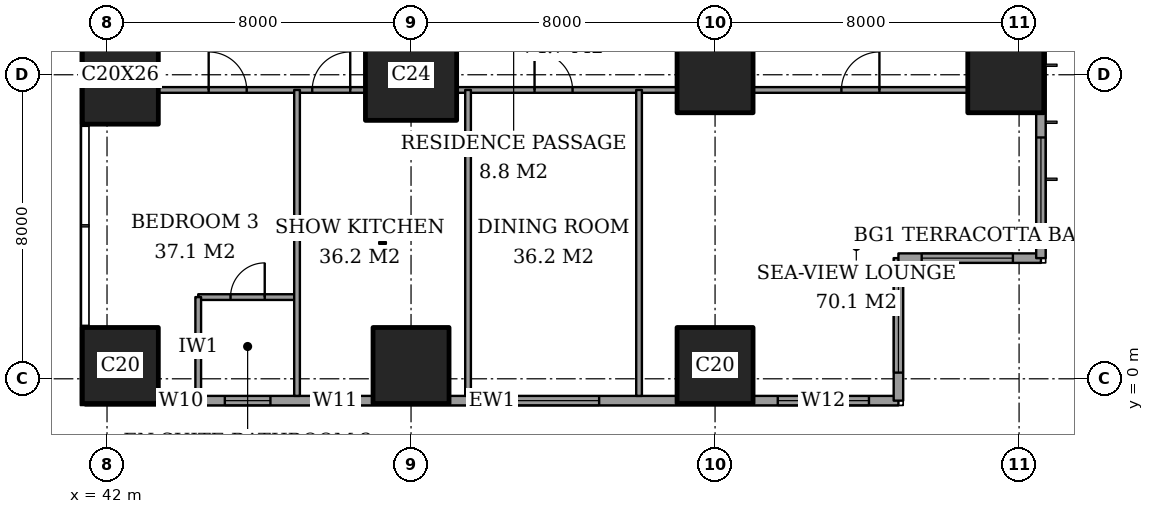
"""IFC4 building model, lengths in metres.
Left out: names, types, materials, properties, quantities, classifications, styles, units other than length and angle.
Written with IfcOpenShell. Run it as: python <this file> out.ifc"""

import sys

from ifc_helpers import new_model, si_unit, direction, frame, frame_2d, origin, origin_2d, place, context, subcontext, project, spatial, rectangle, extrude, element, fill, save


model = new_model("IFC4")
c1 = context("Model", 3, precision=1e-05, world=origin(), true_north=direction((0.0, 1.0)))
c2 = subcontext(c1, "Body", "Model", "MODEL_VIEW")
j1 = project(units=[si_unit("LENGTHUNIT", "METRE"), si_unit("PLANEANGLEUNIT", "RADIAN")], contexts=[c1])
p1 = place(None, origin())
s1 = spatial("IfcSite", under=j1, at=p1, CompositionType="ELEMENT")
p2 = place(p1, origin())
s2 = spatial("IfcBuilding", under=s1, at=p2, CompositionType="ELEMENT")
p3 = place(p2, frame((0.0, 0.0, 99.8)))
s3 = spatial("IfcBuildingStorey", under=s2, at=p3, CompositionType="ELEMENT", Elevation=99.8)
p4 = place(p3, frame((42.35, 0.35, 0.0), z_axis=(0.0, 0.0, 1.0), x_axis=(1.0, 0.0, 0.0)))
e1 = element("IfcColumn", 1, at=p4, inside=s3, PredefinedType="COLUMN", context=c2, shape_type="SweptSolid", body=[
    extrude(rectangle(XDim=2.0, YDim=2.0, at=origin_2d()), origin(), (0.0, 0.0, 1.0), 3.6),
])
p5 = place(p3, frame((42.35, 8.0, 0.0), z_axis=(0.0, 0.0, 1.0), x_axis=(1.0, 0.0, 0.0)))
e2 = element("IfcColumn", 2, at=p5, inside=s3, PredefinedType="COLUMN", context=c2, shape_type="SweptSolid", body=[
    extrude(rectangle(XDim=2.0, YDim=2.6, at=origin_2d()), origin(), (0.0, 0.0, 1.0), 3.6),
])
p6 = place(p3, frame((50.0, 0.35, 0.0), z_axis=(0.0, 0.0, 1.0), x_axis=(1.0, 0.0, 0.0)))
e3 = element("IfcColumn", 3, at=p6, inside=s3, PredefinedType="COLUMN", context=c2, shape_type="SweptSolid", body=[
    extrude(rectangle(XDim=2.0, YDim=2.0, at=origin_2d()), origin(), (0.0, 0.0, 1.0), 3.6),
])
p7 = place(p3, frame((50.0, 8.0, 0.0), z_axis=(0.0, 0.0, 1.0), x_axis=(1.0, 0.0, 0.0)))
e4 = element("IfcColumn", 4, at=p7, inside=s3, PredefinedType="COLUMN", context=c2, shape_type="SweptSolid", body=[
    extrude(rectangle(XDim=2.4, YDim=2.4, at=origin_2d()), origin(), (0.0, 0.0, 1.0), 3.6),
])
for number, where, z_axis, x_axis in (
    (5, (58.0, 0.35, 0.0), (0.0, 0.0, 1.0), (1.0, 0.0, 0.0)),
    (6, (58.0, 8.0, 0.0), (0.0, 0.0, 1.0), (1.0, 0.0, 0.0)),
    (7, (65.65, 8.0, 0.0), (0.0, 0.0, 1.0), (1.0, 0.0, 0.0)),
):
    element("IfcColumn", number, at=place(p3, frame(where, z_axis=z_axis, x_axis=x_axis)), inside=s3, PredefinedType="COLUMN", context=c2, shape_type="SweptSolid", body=[
        extrude(rectangle(XDim=2.0, YDim=2.0, at=origin_2d()), origin(), (0.0, 0.0, 1.0), 3.6),
    ])
p8 = place(p3, frame((41.425, -0.575, 0.0), z_axis=(0.0, 0.0, 1.0), x_axis=(1.0, 0.0, 0.0)))
e8 = element("IfcWall", 8, at=p8, inside=s3, PredefinedType="SOLIDWALL", context=c2, shape_type="SweptSolid", body=[
    extrude(rectangle(XDim=21.4, YDim=0.25, at=frame_2d((10.7, 0.0))), origin(), (0.0, 0.0, 1.0), 3.6),
])
p9 = place(p8, frame((2.225, 0.0, 0.4)))
e9 = element("IfcOpeningElement", 9, at=p9, cuts=e8, PredefinedType="OPENING", context=c2, shape_type="SweptSolid", body=[
    extrude(rectangle(XDim=0.6, YDim=2.2, at=frame_2d((0.3, 1.1))), frame((0.0, 0.135, 0.0), z_axis=(0.0, -1.0, 0.0), x_axis=(1.0, 0.0, 0.0)), (0.0, 0.0, 1.0), 0.27),
])
p10 = place(p8, frame((3.675, 0.0, 0.4)))
e10 = element("IfcOpeningElement", 10, at=p10, cuts=e8, PredefinedType="OPENING", context=c2, shape_type="SweptSolid", body=[
    extrude(rectangle(XDim=1.2, YDim=2.2, at=frame_2d((0.6, 1.1))), frame((0.0, 0.135, 0.0), z_axis=(0.0, -1.0, 0.0), x_axis=(1.0, 0.0, 0.0)), (0.0, 0.0, 1.0), 0.27),
])
p11 = place(p8, frame((5.975, 0.0, 0.4)))
e11 = element("IfcOpeningElement", 11, at=p11, cuts=e8, PredefinedType="OPENING", context=c2, shape_type="SweptSolid", body=[
    extrude(rectangle(XDim=1.2, YDim=2.2, at=frame_2d((0.6, 1.1))), frame((0.0, 0.135, 0.0), z_axis=(0.0, -1.0, 0.0), x_axis=(1.0, 0.0, 0.0)), (0.0, 0.0, 1.0), 0.27),
])
p12 = place(p8, frame((11.125, 0.0, 0.4)))
e12 = element("IfcOpeningElement", 12, at=p12, cuts=e8, PredefinedType="OPENING", context=c2, shape_type="SweptSolid", body=[
    extrude(rectangle(XDim=2.4, YDim=2.2, at=frame_2d((1.2, 1.1))), frame((0.0, 0.135, 0.0), z_axis=(0.0, -1.0, 0.0), x_axis=(1.0, 0.0, 0.0)), (0.0, 0.0, 1.0), 0.27),
])
p13 = place(p8, frame((18.225, 0.0, 0.4)))
e13 = element("IfcOpeningElement", 13, at=p13, cuts=e8, PredefinedType="OPENING", context=c2, shape_type="SweptSolid", body=[
    extrude(rectangle(XDim=2.4, YDim=2.2, at=frame_2d((1.2, 1.1))), frame((0.0, 0.135, 0.0), z_axis=(0.0, -1.0, 0.0), x_axis=(1.0, 0.0, 0.0)), (0.0, 0.0, 1.0), 0.27),
])
p14 = place(p3, frame((62.825, -0.575, 0.0), z_axis=(0.0, 0.0, 1.0), x_axis=(0.0, 1.0, 0.0)))
e14 = element("IfcWall", 14, at=p14, inside=s3, PredefinedType="SOLIDWALL", context=c2, shape_type="SweptSolid", body=[
    extrude(rectangle(XDim=3.75, YDim=0.25, at=frame_2d((1.875, 0.0))), origin(), (0.0, 0.0, 1.0), 3.6),
])
p15 = place(p14, frame((0.738, 0.0, 0.4)))
e15 = element("IfcOpeningElement", 15, at=p15, cuts=e14, PredefinedType="OPENING", context=c2, shape_type="SweptSolid", body=[
    extrude(rectangle(XDim=2.4, YDim=2.2, at=frame_2d((1.2, 1.1))), frame((0.0, 0.135, 0.0), z_axis=(0.0, -1.0, 0.0), x_axis=(1.0, 0.0, 0.0)), (0.0, 0.0, 1.0), 0.27),
])
p16 = place(p3, frame((62.825, 3.175, 0.0), z_axis=(0.0, 0.0, 1.0), x_axis=(1.0, 0.0, 0.0)))
e16 = element("IfcWall", 16, at=p16, inside=s3, PredefinedType="SOLIDWALL", context=c2, shape_type="SweptSolid", body=[
    extrude(rectangle(XDim=3.75, YDim=0.25, at=frame_2d((1.875, 0.0))), origin(), (0.0, 0.0, 1.0), 3.6),
])
p17 = place(p16, frame((0.613, 0.0, 0.4)))
e17 = element("IfcOpeningElement", 17, at=p17, cuts=e16, PredefinedType="OPENING", context=c2, shape_type="SweptSolid", body=[
    extrude(rectangle(XDim=2.4, YDim=2.2, at=frame_2d((1.2, 1.1))), frame((0.0, 0.135, 0.0), z_axis=(0.0, -1.0, 0.0), x_axis=(1.0, 0.0, 0.0)), (0.0, 0.0, 1.0), 0.27),
])
p18 = place(p3, frame((66.575, 3.175, 0.0), z_axis=(0.0, 0.0, 1.0), x_axis=(0.0, 1.0, 0.0)))
e18 = element("IfcWall", 18, at=p18, inside=s3, PredefinedType="SOLIDWALL", context=c2, shape_type="SweptSolid", body=[
    extrude(rectangle(XDim=41.65, YDim=0.25, at=frame_2d((20.825, 0.0))), origin(), (0.0, 0.0, 1.0), 3.6),
])
p19 = place(p18, frame((0.775, 0.0, 0.4)))
e19 = element("IfcOpeningElement", 19, at=p19, cuts=e18, PredefinedType="OPENING", context=c2, shape_type="SweptSolid", body=[
    extrude(rectangle(XDim=2.4, YDim=2.2, at=frame_2d((1.2, 1.1))), frame((0.0, 0.135, 0.0), z_axis=(0.0, -1.0, 0.0), x_axis=(1.0, 0.0, 0.0)), (0.0, 0.0, 1.0), 0.27),
])
p20 = place(p18, frame((6.1, 0.0, 0.4)))
e20 = element("IfcOpeningElement", 20, at=p20, cuts=e18, PredefinedType="OPENING", context=c2, shape_type="SweptSolid", body=[
    extrude(rectangle(XDim=1.2, YDim=2.2, at=frame_2d((0.6, 1.1))), frame((0.0, 0.135, 0.0), z_axis=(0.0, -1.0, 0.0), x_axis=(1.0, 0.0, 0.0)), (0.0, 0.0, 1.0), 0.27),
])
p21 = place(p18, frame((8.275, 0.0, 0.4)))
e21 = element("IfcOpeningElement", 21, at=p21, cuts=e18, PredefinedType="OPENING", context=c2, shape_type="SweptSolid", body=[
    extrude(rectangle(XDim=2.4, YDim=2.2, at=frame_2d((1.2, 1.1))), frame((0.0, 0.135, 0.0), z_axis=(0.0, -1.0, 0.0), x_axis=(1.0, 0.0, 0.0)), (0.0, 0.0, 1.0), 0.27),
])
p22 = place(p18, frame((15.775, 0.0, 0.4)))
e22 = element("IfcOpeningElement", 22, at=p22, cuts=e18, PredefinedType="OPENING", context=c2, shape_type="SweptSolid", body=[
    extrude(rectangle(XDim=2.4, YDim=2.2, at=frame_2d((1.2, 1.1))), frame((0.0, 0.135, 0.0), z_axis=(0.0, -1.0, 0.0), x_axis=(1.0, 0.0, 0.0)), (0.0, 0.0, 1.0), 0.27),
])
p23 = place(p18, frame((23.475, 0.0, 0.4)))
e23 = element("IfcOpeningElement", 23, at=p23, cuts=e18, PredefinedType="OPENING", context=c2, shape_type="SweptSolid", body=[
    extrude(rectangle(XDim=2.4, YDim=2.2, at=frame_2d((1.2, 1.1))), frame((0.0, 0.135, 0.0), z_axis=(0.0, -1.0, 0.0), x_axis=(1.0, 0.0, 0.0)), (0.0, 0.0, 1.0), 0.27),
])
p24 = place(p18, frame((30.975, 0.0, 0.4)))
e24 = element("IfcOpeningElement", 24, at=p24, cuts=e18, PredefinedType="OPENING", context=c2, shape_type="SweptSolid", body=[
    extrude(rectangle(XDim=2.4, YDim=2.2, at=frame_2d((1.2, 1.1))), frame((0.0, 0.135, 0.0), z_axis=(0.0, -1.0, 0.0), x_axis=(1.0, 0.0, 0.0)), (0.0, 0.0, 1.0), 0.27),
])
p25 = place(p18, frame((34.5, 0.0, 0.4)))
e25 = element("IfcOpeningElement", 25, at=p25, cuts=e18, PredefinedType="OPENING", context=c2, shape_type="SweptSolid", body=[
    extrude(rectangle(XDim=1.2, YDim=2.2, at=frame_2d((0.6, 1.1))), frame((0.0, 0.135, 0.0), z_axis=(0.0, -1.0, 0.0), x_axis=(1.0, 0.0, 0.0)), (0.0, 0.0, 1.0), 0.27),
])
p26 = place(p18, frame((38.475, 0.0, 0.4)))
e26 = element("IfcOpeningElement", 26, at=p26, cuts=e18, PredefinedType="OPENING", context=c2, shape_type="SweptSolid", body=[
    extrude(rectangle(XDim=2.4, YDim=2.2, at=frame_2d((1.2, 1.1))), frame((0.0, 0.135, 0.0), z_axis=(0.0, -1.0, 0.0), x_axis=(1.0, 0.0, 0.0)), (0.0, 0.0, 1.0), 0.27),
])
p27 = place(p3, frame((44.4, 2.15, 0.0), z_axis=(0.0, 0.0, 1.0), x_axis=(1.0, 0.0, 0.0)))
e27 = element("IfcWall", 27, at=p27, inside=s3, PredefinedType="PARTITIONING", context=c2, shape_type="SweptSolid", body=[
    extrude(rectangle(XDim=2.6, YDim=0.15, at=frame_2d((1.3, 0.0))), origin(), (0.0, 0.0, 1.0), 3.35),
])
p28 = place(p27, frame((0.85, 0.0, 0.0)))
e28 = element("IfcOpeningElement", 28, at=p28, cuts=e27, PredefinedType="OPENING", context=c2, shape_type="SweptSolid", body=[
    extrude(rectangle(XDim=0.9, YDim=2.1, at=frame_2d((0.45, 1.05))), frame((0.0, 0.085, 0.0), z_axis=(0.0, -1.0, 0.0), x_axis=(1.0, 0.0, 0.0)), (0.0, 0.0, 1.0), 0.17),
])
p29 = place(p3, frame((43.35, 7.6, 0.0), z_axis=(0.0, 0.0, 1.0), x_axis=(1.0, 0.0, 0.0)))
e29 = element("IfcWall", 29, at=p29, inside=s3, PredefinedType="PARTITIONING", context=c2, shape_type="SweptSolid", body=[
    extrude(rectangle(XDim=5.45, YDim=0.15, at=frame_2d((2.725, 0.0))), origin(), (0.0, 0.0, 1.0), 3.35),
])
p30 = place(p29, frame((4.05, 0.0, 0.0)))
e30 = element("IfcOpeningElement", 30, at=p30, cuts=e29, PredefinedType="OPENING", context=c2, shape_type="SweptSolid", body=[
    extrude(rectangle(XDim=1.0, YDim=2.1, at=frame_2d((0.5, 1.05))), frame((0.0, 0.085, 0.0), z_axis=(0.0, -1.0, 0.0), x_axis=(1.0, 0.0, 0.0)), (0.0, 0.0, 1.0), 0.17),
])
p31 = place(p29, frame((1.325, 0.0, 0.0)))
e31 = element("IfcOpeningElement", 31, at=p31, cuts=e29, PredefinedType="OPENING", context=c2, shape_type="SweptSolid", body=[
    extrude(rectangle(XDim=1.0, YDim=2.1, at=frame_2d((0.5, 1.05))), frame((0.0, 0.085, 0.0), z_axis=(0.0, -1.0, 0.0), x_axis=(1.0, 0.0, 0.0)), (0.0, 0.0, 1.0), 0.17),
])
p32 = place(p3, frame((51.2, 7.6, 0.0), z_axis=(0.0, 0.0, 1.0), x_axis=(1.0, 0.0, 0.0)))
e32 = element("IfcWall", 32, at=p32, inside=s3, PredefinedType="PARTITIONING", context=c2, shape_type="SweptSolid", body=[
    extrude(rectangle(XDim=5.8, YDim=0.15, at=frame_2d((2.9, 0.0))), origin(), (0.0, 0.0, 1.0), 3.35),
])
p33 = place(p32, frame((2.05, 0.0, 0.0)))
e33 = element("IfcOpeningElement", 33, at=p33, cuts=e32, PredefinedType="OPENING", context=c2, shape_type="SweptSolid", body=[
    extrude(rectangle(XDim=1.0, YDim=2.1, at=frame_2d((0.5, 1.05))), frame((0.0, 0.085, 0.0), z_axis=(0.0, -1.0, 0.0), x_axis=(1.0, 0.0, 0.0)), (0.0, 0.0, 1.0), 0.17),
])
p34 = place(p3, frame((59.0, 7.6, 0.0), z_axis=(0.0, 0.0, 1.0), x_axis=(1.0, 0.0, 0.0)))
e34 = element("IfcWall", 34, at=p34, inside=s3, PredefinedType="PARTITIONING", context=c2, shape_type="SweptSolid", body=[
    extrude(rectangle(XDim=5.65, YDim=0.15, at=frame_2d((2.825, 0.0))), origin(), (0.0, 0.0, 1.0), 3.35),
])
p35 = place(p34, frame((2.325, 0.0, 0.0)))
e35 = element("IfcOpeningElement", 35, at=p35, cuts=e34, PredefinedType="OPENING", context=c2, shape_type="SweptSolid", body=[
    extrude(rectangle(XDim=1.0, YDim=2.1, at=frame_2d((0.5, 1.05))), frame((0.0, 0.085, 0.0), z_axis=(0.0, -1.0, 0.0), x_axis=(1.0, 0.0, 0.0)), (0.0, 0.0, 1.0), 0.17),
])
p36 = place(p3, frame((44.4, -0.45, 0.0), z_axis=(0.0, 0.0, 1.0), x_axis=(0.0, 1.0, 0.0)))
e36 = element("IfcWall", 36, at=p36, inside=s3, PredefinedType="PARTITIONING", context=c2, shape_type="SweptSolid", body=[
    extrude(rectangle(XDim=2.6, YDim=0.15, at=frame_2d((1.3, 0.0))), origin(), (0.0, 0.0, 1.0), 3.35),
])
for number, where, z_axis, x_axis in (
    (37, (47.0, -0.45, 0.0), (0.0, 0.0, 1.0), (0.0, 1.0, 0.0)),
    (38, (51.5, -0.45, 0.0), (0.0, 0.0, 1.0), (0.0, 1.0, 0.0)),
    (39, (56.0, -0.45, 0.0), (0.0, 0.0, 1.0), (0.0, 1.0, 0.0)),
):
    element("IfcWall", number, at=place(p3, frame(where, z_axis=z_axis, x_axis=x_axis)), inside=s3, PredefinedType="PARTITIONING", context=c2, shape_type="SweptSolid", body=[
        extrude(rectangle(XDim=8.05, YDim=0.15, at=frame_2d((4.025, 0.0))), origin(), (0.0, 0.0, 1.0), 3.35),
    ])
p37 = place(p9, origin())
e40 = element("IfcWindow", 40, at=p37, inside=s3, PartitioningType="SINGLE_PANEL", PredefinedType="WINDOW", context=c2, shape_type="SweptSolid", body=[
    extrude(rectangle(XDim=0.6, YDim=2.2, at=frame_2d((0.3, 1.1))), frame((0.0, 0.03, 0.0), z_axis=(0.0, -1.0, 0.0), x_axis=(1.0, 0.0, 0.0)), (0.0, 0.0, 1.0), 0.06),
])
fill(e9, e40)
p38 = place(p10, origin())
e41 = element("IfcWindow", 41, at=p38, inside=s3, PartitioningType="SINGLE_PANEL", PredefinedType="WINDOW", context=c2, shape_type="SweptSolid", body=[
    extrude(rectangle(XDim=1.2, YDim=2.2, at=frame_2d((0.6, 1.1))), frame((0.0, 0.03, 0.0), z_axis=(0.0, -1.0, 0.0), x_axis=(1.0, 0.0, 0.0)), (0.0, 0.0, 1.0), 0.06),
])
fill(e10, e41)
p39 = place(p11, origin())
e42 = element("IfcWindow", 42, at=p39, inside=s3, PartitioningType="SINGLE_PANEL", PredefinedType="WINDOW", context=c2, shape_type="SweptSolid", body=[
    extrude(rectangle(XDim=1.2, YDim=2.2, at=frame_2d((0.6, 1.1))), frame((0.0, 0.03, 0.0), z_axis=(0.0, -1.0, 0.0), x_axis=(1.0, 0.0, 0.0)), (0.0, 0.0, 1.0), 0.06),
])
fill(e11, e42)
p40 = place(p12, origin())
e43 = element("IfcWindow", 43, at=p40, inside=s3, PartitioningType="SINGLE_PANEL", PredefinedType="WINDOW", context=c2, shape_type="SweptSolid", body=[
    extrude(rectangle(XDim=2.4, YDim=2.2, at=frame_2d((1.2, 1.1))), frame((0.0, 0.03, 0.0), z_axis=(0.0, -1.0, 0.0), x_axis=(1.0, 0.0, 0.0)), (0.0, 0.0, 1.0), 0.06),
])
fill(e12, e43)
p41 = place(p13, origin())
e44 = element("IfcWindow", 44, at=p41, inside=s3, PartitioningType="SINGLE_PANEL", PredefinedType="WINDOW", context=c2, shape_type="SweptSolid", body=[
    extrude(rectangle(XDim=2.4, YDim=2.2, at=frame_2d((1.2, 1.1))), frame((0.0, 0.03, 0.0), z_axis=(0.0, -1.0, 0.0), x_axis=(1.0, 0.0, 0.0)), (0.0, 0.0, 1.0), 0.06),
])
fill(e13, e44)
p42 = place(p15, origin())
e45 = element("IfcWindow", 45, at=p42, inside=s3, PartitioningType="SINGLE_PANEL", PredefinedType="WINDOW", context=c2, shape_type="SweptSolid", body=[
    extrude(rectangle(XDim=2.4, YDim=2.2, at=frame_2d((1.2, 1.1))), frame((0.0, 0.03, 0.0), z_axis=(0.0, -1.0, 0.0), x_axis=(1.0, 0.0, 0.0)), (0.0, 0.0, 1.0), 0.06),
])
fill(e15, e45)
p43 = place(p17, origin())
e46 = element("IfcWindow", 46, at=p43, inside=s3, PartitioningType="SINGLE_PANEL", PredefinedType="WINDOW", context=c2, shape_type="SweptSolid", body=[
    extrude(rectangle(XDim=2.4, YDim=2.2, at=frame_2d((1.2, 1.1))), frame((0.0, 0.03, 0.0), z_axis=(0.0, -1.0, 0.0), x_axis=(1.0, 0.0, 0.0)), (0.0, 0.0, 1.0), 0.06),
])
fill(e17, e46)
p44 = place(p19, origin())
e47 = element("IfcWindow", 47, at=p44, inside=s3, PartitioningType="SINGLE_PANEL", PredefinedType="WINDOW", context=c2, shape_type="SweptSolid", body=[
    extrude(rectangle(XDim=2.4, YDim=2.2, at=frame_2d((1.2, 1.1))), frame((0.0, 0.03, 0.0), z_axis=(0.0, -1.0, 0.0), x_axis=(1.0, 0.0, 0.0)), (0.0, 0.0, 1.0), 0.06),
])
fill(e19, e47)
p45 = place(p35, origin())
e48 = element("IfcDoor", 48, at=p45, inside=s3, OperationType="SINGLE_SWING_LEFT", PredefinedType="DOOR", context=c2, shape_type="SweptSolid", body=[
    extrude(rectangle(XDim=1.0, YDim=2.1, at=frame_2d((0.5, 1.05))), frame((0.0, 0.025, 0.0), z_axis=(0.0, -1.0, 0.0), x_axis=(1.0, 0.0, 0.0)), (0.0, 0.0, 1.0), 0.05),
])
fill(e35, e48)
p46 = place(p33, origin())
e49 = element("IfcDoor", 49, at=p46, inside=s3, OperationType="SINGLE_SWING_RIGHT", PredefinedType="DOOR", context=c2, shape_type="SweptSolid", body=[
    extrude(rectangle(XDim=1.0, YDim=2.1, at=frame_2d((0.5, 1.05))), frame((0.0, 0.025, 0.0), z_axis=(0.0, -1.0, 0.0), x_axis=(1.0, 0.0, 0.0)), (0.0, 0.0, 1.0), 0.05),
])
fill(e33, e49)
p47 = place(p30, origin())
e50 = element("IfcDoor", 50, at=p47, inside=s3, OperationType="SINGLE_SWING_LEFT", PredefinedType="DOOR", context=c2, shape_type="SweptSolid", body=[
    extrude(rectangle(XDim=1.0, YDim=2.1, at=frame_2d((0.5, 1.05))), frame((0.0, 0.025, 0.0), z_axis=(0.0, -1.0, 0.0), x_axis=(1.0, 0.0, 0.0)), (0.0, 0.0, 1.0), 0.05),
])
fill(e30, e50)
p48 = place(p28, origin())
e51 = element("IfcDoor", 51, at=p48, inside=s3, OperationType="SINGLE_SWING_LEFT", PredefinedType="DOOR", context=c2, shape_type="SweptSolid", body=[
    extrude(rectangle(XDim=0.9, YDim=2.1, at=frame_2d((0.45, 1.05))), frame((0.0, 0.025, 0.0), z_axis=(0.0, -1.0, 0.0), x_axis=(1.0, 0.0, 0.0)), (0.0, 0.0, 1.0), 0.05),
])
fill(e28, e51)
p49 = place(p31, origin())
e52 = element("IfcDoor", 52, at=p49, inside=s3, OperationType="SINGLE_SWING_RIGHT", PredefinedType="DOOR", context=c2, shape_type="SweptSolid", body=[
    extrude(rectangle(XDim=1.0, YDim=2.1, at=frame_2d((0.5, 1.05))), frame((0.0, 0.025, 0.0), z_axis=(0.0, -1.0, 0.0), x_axis=(1.0, 0.0, 0.0)), (0.0, 0.0, 1.0), 0.05),
])
fill(e31, e52)
save(model, sys.argv[1])
